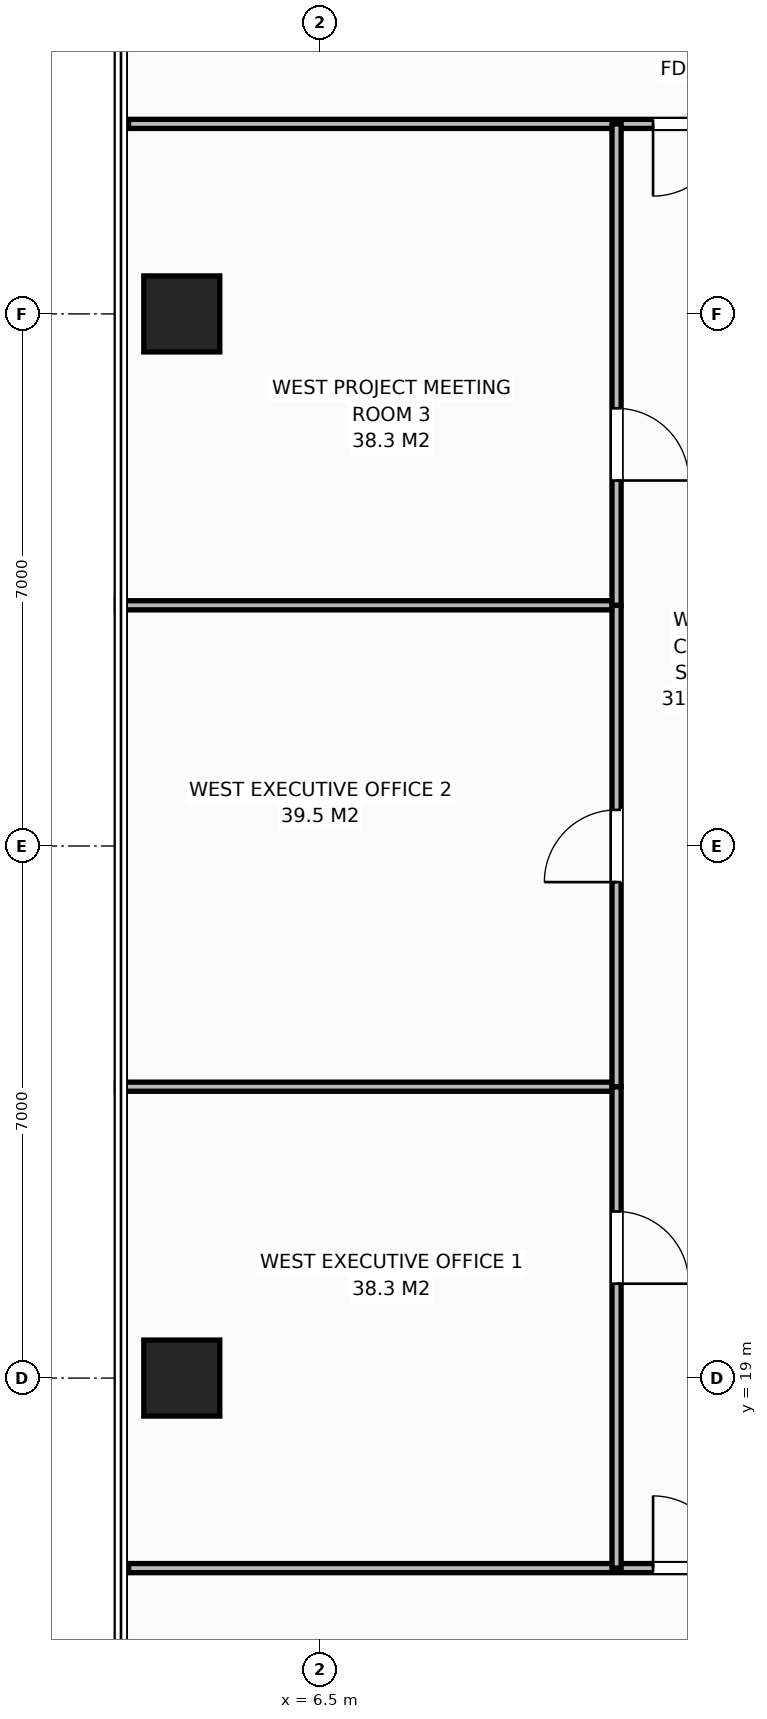
"""IFC4 building model, lengths in metres.
Left out: names, types, materials, properties, quantities, classifications, styles, units other than length and angle.
Written with IfcOpenShell. Run it as: python <this file> out.ifc"""

import sys

from ifc_helpers import new_model, si_unit, direction, frame, frame_2d, origin, origin_2d, place, context, subcontext, project, spatial, rectangle, extrude, element, fill, save


model = new_model("IFC4")
c1 = context("Model", 3, precision=1e-05, world=origin(), true_north=direction((0.0, 1.0)))
c2 = subcontext(c1, "Body", "Model", "MODEL_VIEW")
j1 = project(units=[si_unit("LENGTHUNIT", "METRE"), si_unit("PLANEANGLEUNIT", "RADIAN")], contexts=[c1])
p1 = place(None, origin())
s1 = spatial("IfcSite", under=j1, at=p1, CompositionType="ELEMENT")
p2 = place(p1, origin())
s2 = spatial("IfcBuilding", under=s1, at=p2, CompositionType="ELEMENT")
p3 = place(p2, frame((0.0, 0.0, 155.6)))
s3 = spatial("IfcBuildingStorey", under=s2, at=p3, CompositionType="ELEMENT", Elevation=155.6)
for number, where, z_axis, x_axis in (
    (1, (4.68, 19.0, 0.0), (0.0, 0.0, 1.0), (1.0, 0.0, 0.0)),
    (2, (4.68, 33.0, 0.0), (0.0, 0.0, 1.0), (1.0, 0.0, 0.0)),
):
    element("IfcColumn", number, at=place(p3, frame(where, z_axis=z_axis, x_axis=x_axis)), inside=s3, PredefinedType="COLUMN", context=c2, shape_type="SweptSolid", body=[
        extrude(rectangle(XDim=1.0, YDim=1.0, at=origin_2d()), origin(), (0.0, 0.0, 1.0), 3.8),
    ])
p4 = place(p3, frame((3.98, 35.5, 0.0), z_axis=(0.0, 0.0, 1.0), x_axis=(1.0, 0.0, 0.0)))
e3 = element("IfcWall", 3, at=p4, inside=s3, PredefinedType="PARTITIONING", context=c2, shape_type="SweptSolid", body=[
    extrude(rectangle(XDim=11.09, YDim=0.12, at=frame_2d((5.545, 0.0))), origin(), (0.0, 0.0, 1.0), 3.572),
])
p5 = place(p4, frame((6.9, 0.0, 0.0)))
e4 = element("IfcOpeningElement", 4, at=p5, cuts=e3, PredefinedType="OPENING", context=c2, shape_type="SweptSolid", body=[
    extrude(rectangle(XDim=0.95, YDim=2.15, at=frame_2d((0.475, 1.075))), frame((0.0, 0.07, 0.0), z_axis=(0.0, -1.0, 0.0), x_axis=(1.0, 0.0, 0.0)), (0.0, 0.0, 1.0), 0.14),
])
p6 = place(p3, frame((3.98, 16.5, 0.0), z_axis=(0.0, 0.0, 1.0), x_axis=(1.0, 0.0, 0.0)))
e5 = element("IfcWall", 5, at=p6, inside=s3, PredefinedType="PARTITIONING", context=c2, shape_type="SweptSolid", body=[
    extrude(rectangle(XDim=9.16, YDim=0.12, at=frame_2d((4.58, 0.0))), origin(), (0.0, 0.0, 1.0), 3.572),
])
p7 = place(p6, frame((6.9, 0.0, 0.0)))
e6 = element("IfcOpeningElement", 6, at=p7, cuts=e5, PredefinedType="OPENING", context=c2, shape_type="SweptSolid", body=[
    extrude(rectangle(XDim=0.95, YDim=2.15, at=frame_2d((0.475, 1.075))), frame((0.0, 0.07, 0.0), z_axis=(0.0, -1.0, 0.0), x_axis=(1.0, 0.0, 0.0)), (0.0, 0.0, 1.0), 0.14),
])
p8 = place(p3, frame((3.82, 22.833, 0.0), z_axis=(0.0, 0.0, 1.0), x_axis=(1.0, 0.0, 0.0)))
e7 = element("IfcWall", 7, at=p8, inside=s3, PredefinedType="PARTITIONING", context=c2, shape_type="SweptSolid", body=[
    extrude(rectangle(XDim=6.58, YDim=0.12, at=frame_2d((3.29, 0.0))), origin(), (0.0, 0.0, 1.0), 3.572),
])
p9 = place(p3, frame((10.4, 16.5, 0.0), z_axis=(0.0, 0.0, 1.0), x_axis=(0.0, 1.0, 0.0)))
e8 = element("IfcWall", 8, at=p9, inside=s3, PredefinedType="PARTITIONING", context=c2, shape_type="SweptSolid", body=[
    extrude(rectangle(XDim=6.333, YDim=0.12, at=frame_2d((3.167, 0.0))), origin(), (0.0, 0.0, 1.0), 3.572),
])
p10 = place(p9, frame((3.742, 0.0, 0.0)))
e9 = element("IfcOpeningElement", 9, at=p10, cuts=e8, PredefinedType="OPENING", context=c2, shape_type="SweptSolid", body=[
    extrude(rectangle(XDim=0.95, YDim=2.15, at=frame_2d((0.475, 1.075))), frame((0.0, 0.07, 0.0), z_axis=(0.0, -1.0, 0.0), x_axis=(1.0, 0.0, 0.0)), (0.0, 0.0, 1.0), 0.14),
])
p11 = place(p3, frame((3.82, 29.167, 0.0), z_axis=(0.0, 0.0, 1.0), x_axis=(1.0, 0.0, 0.0)))
e10 = element("IfcWall", 10, at=p11, inside=s3, PredefinedType="PARTITIONING", context=c2, shape_type="SweptSolid", body=[
    extrude(rectangle(XDim=6.58, YDim=0.12, at=frame_2d((3.29, 0.0))), origin(), (0.0, 0.0, 1.0), 3.572),
])
p12 = place(p3, frame((10.4, 22.833, 0.0), z_axis=(0.0, 0.0, 1.0), x_axis=(0.0, 1.0, 0.0)))
e11 = element("IfcWall", 11, at=p12, inside=s3, PredefinedType="PARTITIONING", context=c2, shape_type="SweptSolid", body=[
    extrude(rectangle(XDim=6.333, YDim=0.12, at=frame_2d((3.167, 0.0))), origin(), (0.0, 0.0, 1.0), 3.572),
])
p13 = place(p12, frame((2.692, 0.0, 0.0)))
e12 = element("IfcOpeningElement", 12, at=p13, cuts=e11, PredefinedType="OPENING", context=c2, shape_type="SweptSolid", body=[
    extrude(rectangle(XDim=0.95, YDim=2.15, at=frame_2d((0.475, 1.075))), frame((0.0, 0.07, 0.0), z_axis=(0.0, -1.0, 0.0), x_axis=(1.0, 0.0, 0.0)), (0.0, 0.0, 1.0), 0.14),
])
p14 = place(p3, frame((10.4, 29.167, 0.0), z_axis=(0.0, 0.0, 1.0), x_axis=(0.0, 1.0, 0.0)))
e13 = element("IfcWall", 13, at=p14, inside=s3, PredefinedType="PARTITIONING", context=c2, shape_type="SweptSolid", body=[
    extrude(rectangle(XDim=6.333, YDim=0.12, at=frame_2d((3.167, 0.0))), origin(), (0.0, 0.0, 1.0), 3.572),
])
p15 = place(p14, frame((1.642, 0.0, 0.0)))
e14 = element("IfcOpeningElement", 14, at=p15, cuts=e13, PredefinedType="OPENING", context=c2, shape_type="SweptSolid", body=[
    extrude(rectangle(XDim=0.95, YDim=2.15, at=frame_2d((0.475, 1.075))), frame((0.0, 0.07, 0.0), z_axis=(0.0, -1.0, 0.0), x_axis=(1.0, 0.0, 0.0)), (0.0, 0.0, 1.0), 0.14),
])
p16 = place(p5, origin())
e15 = element("IfcDoor", 15, at=p16, inside=s3, OperationType="SINGLE_SWING_RIGHT", PredefinedType="DOOR", context=c2, shape_type="SweptSolid", body=[
    extrude(rectangle(XDim=0.95, YDim=2.15, at=frame_2d((0.475, 1.075))), frame((0.0, 0.025, 0.0), z_axis=(0.0, -1.0, 0.0), x_axis=(1.0, 0.0, 0.0)), (0.0, 0.0, 1.0), 0.05),
])
fill(e4, e15)
p17 = place(p7, origin())
e16 = element("IfcDoor", 16, at=p17, inside=s3, OperationType="SINGLE_SWING_LEFT", PredefinedType="DOOR", context=c2, shape_type="SweptSolid", body=[
    extrude(rectangle(XDim=0.95, YDim=2.15, at=frame_2d((0.475, 1.075))), frame((0.0, 0.025, 0.0), z_axis=(0.0, -1.0, 0.0), x_axis=(1.0, 0.0, 0.0)), (0.0, 0.0, 1.0), 0.05),
])
fill(e6, e16)
p18 = place(p10, origin())
e17 = element("IfcDoor", 17, at=p18, inside=s3, OperationType="SINGLE_SWING_RIGHT", PredefinedType="DOOR", context=c2, shape_type="SweptSolid", body=[
    extrude(rectangle(XDim=0.95, YDim=2.15, at=frame_2d((0.475, 1.075))), frame((0.0, 0.025, 0.0), z_axis=(0.0, -1.0, 0.0), x_axis=(1.0, 0.0, 0.0)), (0.0, 0.0, 1.0), 0.05),
])
fill(e9, e17)
p19 = place(p13, origin())
e18 = element("IfcDoor", 18, at=p19, inside=s3, OperationType="SINGLE_SWING_LEFT", PredefinedType="DOOR", context=c2, shape_type="SweptSolid", body=[
    extrude(rectangle(XDim=0.95, YDim=2.15, at=frame_2d((0.475, 1.075))), frame((0.0, 0.025, 0.0), z_axis=(0.0, -1.0, 0.0), x_axis=(1.0, 0.0, 0.0)), (0.0, 0.0, 1.0), 0.05),
])
fill(e12, e18)
p20 = place(p15, origin())
e19 = element("IfcDoor", 19, at=p20, inside=s3, OperationType="SINGLE_SWING_RIGHT", PredefinedType="DOOR", context=c2, shape_type="SweptSolid", body=[
    extrude(rectangle(XDim=0.95, YDim=2.15, at=frame_2d((0.475, 1.075))), frame((0.0, 0.025, 0.0), z_axis=(0.0, -1.0, 0.0), x_axis=(1.0, 0.0, 0.0)), (0.0, 0.0, 1.0), 0.05),
])
fill(e14, e19)
save(model, sys.argv[1])
